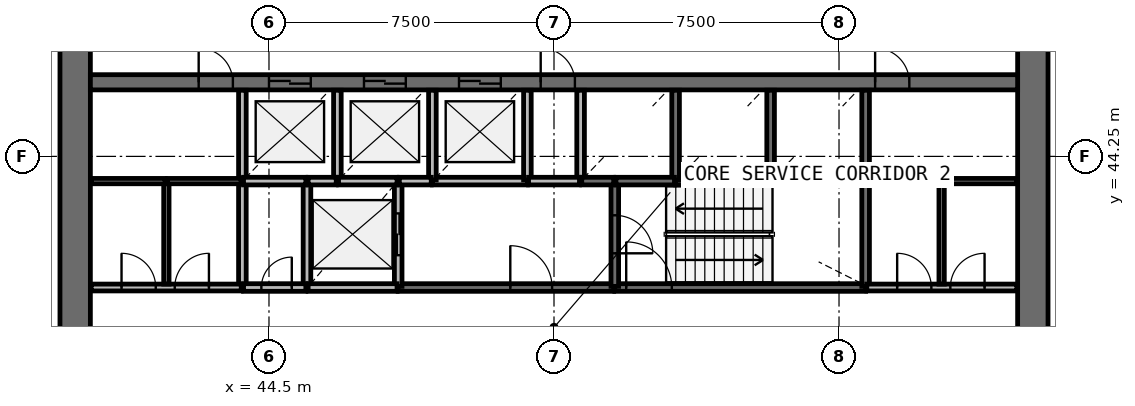
"""IFC4 building model, lengths in metres.
Left out: names, types, materials, properties, quantities, classifications, styles, units other than length and angle.
Written with IfcOpenShell. Run it as: python <this file> out.ifc"""

import sys

from ifc_helpers import new_model, si_unit, direction, frame, frame_2d, origin, place, context, subcontext, project, spatial, rectangle, extrude, source, transform, mapped, element, fill, save


model = new_model("IFC4")
c1 = context("Model", 3, precision=1e-05, world=origin(), true_north=direction((0.0, 1.0)))
c2 = subcontext(c1, "Body", "Model", "MODEL_VIEW")
j1 = project(units=[si_unit("LENGTHUNIT", "METRE"), si_unit("PLANEANGLEUNIT", "RADIAN")], contexts=[c1])
p1 = place(None, origin())
s1 = spatial("IfcSite", under=j1, at=p1, CompositionType="ELEMENT")
p2 = place(p1, origin())
s2 = spatial("IfcBuilding", under=s1, at=p2, CompositionType="ELEMENT")
p3 = place(p2, frame((0.0, 0.0, 92.1)))
s3 = spatial("IfcBuildingStorey", under=s2, at=p3, CompositionType="ELEMENT", Elevation=92.1)
p4 = place(p3, frame((64.6, 38.0, 0.0), z_axis=(0.0, 0.0, 1.0), x_axis=(0.0, 1.0, 0.0)))
e1 = element("IfcWall", 1, at=p4, inside=s3, PredefinedType="SHEAR", context=c2, shape_type="SweptSolid", body=[
    extrude(rectangle(XDim=20.0, YDim=0.8, at=frame_2d((10.0, 0.0))), origin(), (0.0, 0.0, 1.0), 4.1),
])
p5 = place(p4, frame((9.1, 0.0, 0.0)))
e2 = element("IfcOpeningElement", 2, at=p5, cuts=e1, PredefinedType="OPENING", context=c2, shape_type="SweptSolid", body=[
    extrude(rectangle(XDim=1.8, YDim=2.1, at=frame_2d((0.9, 1.05))), frame((0.0, 0.41, 0.0), z_axis=(0.0, -1.0, 0.0), x_axis=(1.0, 0.0, 0.0)), (0.0, 0.0, 1.0), 0.82),
])
p6 = place(p3, frame((39.4, 58.0, 0.0), z_axis=(0.0, 0.0, 1.0), x_axis=(0.0, -1.0, 0.0)))
e3 = element("IfcWall", 3, at=p6, inside=s3, PredefinedType="SHEAR", context=c2, shape_type="SweptSolid", body=[
    extrude(rectangle(XDim=20.0, YDim=0.8, at=frame_2d((10.0, 0.0))), origin(), (0.0, 0.0, 1.0), 4.1),
])
p7 = place(p6, frame((9.1, 0.0, 0.0)))
e4 = element("IfcOpeningElement", 4, at=p7, cuts=e3, PredefinedType="OPENING", context=c2, shape_type="SweptSolid", body=[
    extrude(rectangle(XDim=1.8, YDim=2.1, at=frame_2d((0.9, 1.05))), frame((0.0, 0.41, 0.0), z_axis=(0.0, -1.0, 0.0), x_axis=(1.0, 0.0, 0.0)), (0.0, 0.0, 1.0), 0.82),
])
p8 = place(p3, frame((39.8, 46.2, 0.0), z_axis=(0.0, 0.0, 1.0), x_axis=(1.0, 0.0, 0.0)))
e5 = element("IfcWall", 5, at=p8, inside=s3, PredefinedType="SHEAR", context=c2, shape_type="SweptSolid", body=[
    extrude(rectangle(XDim=24.4, YDim=0.4, at=frame_2d((12.2, 0.0))), origin(), (0.0, 0.0, 1.0), 4.1),
])
p9 = place(p8, frame((4.7, 0.0, 0.0)))
e6 = element("IfcOpeningElement", 6, at=p9, cuts=e5, PredefinedType="OPENING", context=c2, shape_type="SweptSolid", body=[
    extrude(rectangle(XDim=1.1, YDim=2.1, at=frame_2d((0.55, 1.05))), frame((0.0, 0.21, 0.0), z_axis=(0.0, -1.0, 0.0), x_axis=(1.0, 0.0, 0.0)), (0.0, 0.0, 1.0), 0.42),
])
p10 = place(p8, frame((7.2, 0.0, 0.0)))
e7 = element("IfcOpeningElement", 7, at=p10, cuts=e5, PredefinedType="OPENING", context=c2, shape_type="SweptSolid", body=[
    extrude(rectangle(XDim=1.1, YDim=2.1, at=frame_2d((0.55, 1.05))), frame((0.0, 0.21, 0.0), z_axis=(0.0, -1.0, 0.0), x_axis=(1.0, 0.0, 0.0)), (0.0, 0.0, 1.0), 0.42),
])
p11 = place(p8, frame((9.7, 0.0, 0.0)))
e8 = element("IfcOpeningElement", 8, at=p11, cuts=e5, PredefinedType="OPENING", context=c2, shape_type="SweptSolid", body=[
    extrude(rectangle(XDim=1.1, YDim=2.1, at=frame_2d((0.55, 1.05))), frame((0.0, 0.21, 0.0), z_axis=(0.0, -1.0, 0.0), x_axis=(1.0, 0.0, 0.0)), (0.0, 0.0, 1.0), 0.42),
])
p12 = place(p8, frame((20.65, 0.0, 0.0)))
e9 = element("IfcOpeningElement", 9, at=p12, cuts=e5, PredefinedType="OPENING", context=c2, shape_type="SweptSolid", body=[
    extrude(rectangle(XDim=0.9, YDim=2.1, at=frame_2d((0.45, 1.05))), frame((0.0, 0.21, 0.0), z_axis=(0.0, -1.0, 0.0), x_axis=(1.0, 0.0, 0.0)), (0.0, 0.0, 1.0), 0.42),
])
p13 = place(p8, frame((2.85, 0.0, 0.0)))
e10 = element("IfcOpeningElement", 10, at=p13, cuts=e5, PredefinedType="OPENING", context=c2, shape_type="SweptSolid", body=[
    extrude(rectangle(XDim=0.9, YDim=2.1, at=frame_2d((0.45, 1.05))), frame((0.0, 0.21, 0.0), z_axis=(0.0, -1.0, 0.0), x_axis=(1.0, 0.0, 0.0)), (0.0, 0.0, 1.0), 0.42),
])
p14 = place(p8, frame((11.85, 0.0, 0.0)))
e11 = element("IfcOpeningElement", 11, at=p14, cuts=e5, PredefinedType="OPENING", context=c2, shape_type="SweptSolid", body=[
    extrude(rectangle(XDim=0.9, YDim=2.1, at=frame_2d((0.45, 1.05))), frame((0.0, 0.21, 0.0), z_axis=(0.0, -1.0, 0.0), x_axis=(1.0, 0.0, 0.0)), (0.0, 0.0, 1.0), 0.42),
])
p15 = place(p3, frame((53.6, 40.8, 0.0), z_axis=(0.0, 0.0, 1.0), x_axis=(1.0, 0.0, 0.0)))
e12 = element("IfcWall", 12, at=p15, inside=s3, PredefinedType="SOLIDWALL", context=c2, shape_type="SweptSolid", body=[
    extrude(rectangle(XDim=6.6, YDim=0.2, at=frame_2d((3.3, 0.0))), origin(), (0.0, 0.0, 1.0), 3.7),
])
p16 = place(p15, frame((0.3, 0.0, 0.0)))
e13 = element("IfcOpeningElement", 13, at=p16, cuts=e12, PredefinedType="OPENING", context=c2, shape_type="SweptSolid", body=[
    extrude(rectangle(XDim=1.2, YDim=2.1, at=frame_2d((0.6, 1.05))), frame((0.0, 0.11, 0.0), z_axis=(0.0, -1.0, 0.0), x_axis=(1.0, 0.0, 0.0)), (0.0, 0.0, 1.0), 0.22),
])
p17 = place(p3, frame((47.9, 40.8, 0.0), z_axis=(0.0, 0.0, 1.0), x_axis=(1.0, 0.0, 0.0)))
e14 = element("IfcWall", 14, at=p17, inside=s3, PredefinedType="SOLIDWALL", context=c2, shape_type="SweptSolid", body=[
    extrude(rectangle(XDim=5.67, YDim=0.2, at=frame_2d((2.835, 0.0))), origin(), (0.0, 0.0, 1.0), 3.7),
])
p18 = place(p17, frame((2.95, 0.0, 0.0)))
e15 = element("IfcOpeningElement", 15, at=p18, cuts=e14, PredefinedType="OPENING", context=c2, shape_type="SweptSolid", body=[
    extrude(rectangle(XDim=1.1, YDim=2.1, at=frame_2d((0.55, 1.05))), frame((0.0, 0.11, 0.0), z_axis=(0.0, -1.0, 0.0), x_axis=(1.0, 0.0, 0.0)), (0.0, 0.0, 1.0), 0.22),
])
for number, where, z_axis, x_axis in (
    (16, (43.8, 43.6, 0.0), (0.0, 0.0, 1.0), (0.0, -1.0, 0.0)),
    (17, (45.5, 43.6, 0.0), (0.0, 0.0, 1.0), (0.0, -1.0, 0.0)),
):
    element("IfcWall", number, at=place(p3, frame(where, z_axis=z_axis, x_axis=x_axis)), inside=s3, PredefinedType="SOLIDWALL", context=c2, shape_type="SweptSolid", body=[
        extrude(rectangle(XDim=2.8, YDim=0.2, at=frame_2d((1.4, 0.0))), origin(), (0.0, 0.0, 1.0), 3.7),
    ])
p19 = place(p3, frame((47.9, 40.83, 0.0), z_axis=(0.0, 0.0, 1.0), x_axis=(0.0, 1.0, 0.0)))
e18 = element("IfcWall", 18, at=p19, inside=s3, PredefinedType="SOLIDWALL", context=c2, shape_type="SweptSolid", body=[
    extrude(rectangle(XDim=2.77, YDim=0.2, at=frame_2d((1.385, 0.0))), origin(), (0.0, 0.0, 1.0), 3.7),
])
p20 = place(p19, frame((0.82, 0.0, 0.0)))
e19 = element("IfcOpeningElement", 19, at=p20, cuts=e18, PredefinedType="OPENING", context=c2, shape_type="SweptSolid", body=[
    extrude(rectangle(XDim=1.1, YDim=2.1, at=frame_2d((0.55, 1.05))), frame((0.0, 0.11, 0.0), z_axis=(0.0, -1.0, 0.0), x_axis=(1.0, 0.0, 0.0)), (0.0, 0.0, 1.0), 0.22),
])
p21 = place(p3, frame((60.2, 40.83, 0.0), z_axis=(0.0, 0.0, 1.0), x_axis=(0.0, 1.0, 0.0)))
e20 = element("IfcWall", 20, at=p21, inside=s3, PredefinedType="SOLIDWALL", context=c2, shape_type="SweptSolid", body=[
    extrude(rectangle(XDim=2.77, YDim=0.2, at=frame_2d((1.385, 0.0))), origin(), (0.0, 0.0, 1.0), 3.7),
])
p22 = place(p3, frame((53.6, 43.6, 0.0), z_axis=(0.0, 0.0, 1.0), x_axis=(0.0, -1.0, 0.0)))
e21 = element("IfcWall", 21, at=p22, inside=s3, PredefinedType="SOLIDWALL", context=c2, shape_type="SweptSolid", body=[
    extrude(rectangle(XDim=2.77, YDim=0.2, at=frame_2d((1.385, 0.0))), origin(), (0.0, 0.0, 1.0), 3.7),
])
p23 = place(p22, frame((0.9, 0.0, 0.0)))
e22 = element("IfcOpeningElement", 22, at=p23, cuts=e21, PredefinedType="OPENING", context=c2, shape_type="SweptSolid", body=[
    extrude(rectangle(XDim=1.0, YDim=2.1, at=frame_2d((0.5, 1.05))), frame((0.0, 0.11, 0.0), z_axis=(0.0, -1.0, 0.0), x_axis=(1.0, 0.0, 0.0)), (0.0, 0.0, 1.0), 0.22),
])
for number, where, z_axis, x_axis in (
    (23, (48.8, 43.6, 0.0), (0.0, 0.0, 1.0), (1.0, 0.0, 0.0)),
    (24, (55.2, 43.6, 0.0), (0.0, 0.0, 1.0), (1.0, 0.0, 0.0)),
):
    element("IfcWall", number, at=place(p3, frame(where, z_axis=z_axis, x_axis=x_axis)), inside=s3, PredefinedType="SOLIDWALL", context=c2, shape_type="SweptSolid", body=[
        extrude(rectangle(XDim=2.5, YDim=0.2, at=frame_2d((1.25, 0.0))), origin(), (0.0, 0.0, 1.0), 3.7),
    ])
p24 = place(p3, frame((57.73, 43.6, 0.0), z_axis=(0.0, 0.0, 1.0), x_axis=(1.0, 0.0, 0.0)))
e25 = element("IfcWall", 25, at=p24, inside=s3, PredefinedType="SOLIDWALL", context=c2, shape_type="SweptSolid", body=[
    extrude(rectangle(XDim=2.44, YDim=0.2, at=frame_2d((1.22, 0.0))), origin(), (0.0, 0.0, 1.0), 3.7),
])
p25 = place(p3, frame((45.53, 40.8, 0.0), z_axis=(0.0, 0.0, 1.0), x_axis=(1.0, 0.0, 0.0)))
e26 = element("IfcWall", 26, at=p25, inside=s3, PredefinedType="SOLIDWALL", context=c2, shape_type="SweptSolid", body=[
    extrude(rectangle(XDim=2.34, YDim=0.2, at=frame_2d((1.17, 0.0))), origin(), (0.0, 0.0, 1.0), 3.7),
])
p26 = place(p3, frame((43.8, 45.99, 0.0), z_axis=(0.0, 0.0, 1.0), x_axis=(0.0, -1.0, 0.0)))
e27 = element("IfcWall", 27, at=p26, inside=s3, PredefinedType="SOLIDWALL", context=c2, shape_type="SweptSolid", body=[
    extrude(rectangle(XDim=2.36, YDim=0.2, at=frame_2d((1.18, 0.0))), origin(), (0.0, 0.0, 1.0), 3.7),
])
p27 = place(p3, frame((46.3, 43.6, 0.0), z_axis=(0.0, 0.0, 1.0), x_axis=(0.0, 1.0, 0.0)))
e28 = element("IfcWall", 28, at=p27, inside=s3, PredefinedType="SOLIDWALL", context=c2, shape_type="SweptSolid", body=[
    extrude(rectangle(XDim=2.39, YDim=0.2, at=frame_2d((1.195, 0.0))), origin(), (0.0, 0.0, 1.0), 3.7),
])
for number, where, z_axis, x_axis in (
    (29, (48.8, 43.63, 0.0), (0.0, 0.0, 1.0), (0.0, 1.0, 0.0)),
    (30, (51.3, 43.63, 0.0), (0.0, 0.0, 1.0), (0.0, 1.0, 0.0)),
):
    element("IfcWall", number, at=place(p3, frame(where, z_axis=z_axis, x_axis=x_axis)), inside=s3, PredefinedType="SOLIDWALL", context=c2, shape_type="SweptSolid", body=[
        extrude(rectangle(XDim=2.36, YDim=0.2, at=frame_2d((1.18, 0.0))), origin(), (0.0, 0.0, 1.0), 3.7),
    ])
p28 = place(p3, frame((52.7, 45.99, 0.0), z_axis=(0.0, 0.0, 1.0), x_axis=(0.0, -1.0, 0.0)))
e31 = element("IfcWall", 31, at=p28, inside=s3, PredefinedType="SOLIDWALL", context=c2, shape_type="SweptSolid", body=[
    extrude(rectangle(XDim=2.39, YDim=0.2, at=frame_2d((1.195, 0.0))), origin(), (0.0, 0.0, 1.0), 3.7),
])
for number, where, z_axis, x_axis in (
    (32, (55.2, 43.63, 0.0), (0.0, 0.0, 1.0), (0.0, 1.0, 0.0)),
    (33, (57.7, 43.63, 0.0), (0.0, 0.0, 1.0), (0.0, 1.0, 0.0)),
    (34, (60.2, 43.63, 0.0), (0.0, 0.0, 1.0), (0.0, 1.0, 0.0)),
):
    element("IfcWall", number, at=place(p3, frame(where, z_axis=z_axis, x_axis=x_axis)), inside=s3, PredefinedType="SOLIDWALL", context=c2, shape_type="SweptSolid", body=[
        extrude(rectangle(XDim=2.36, YDim=0.2, at=frame_2d((1.18, 0.0))), origin(), (0.0, 0.0, 1.0), 3.7),
    ])
p29 = place(p3, frame((43.83, 43.6, 0.0), z_axis=(0.0, 0.0, 1.0), x_axis=(1.0, 0.0, 0.0)))
e35 = element("IfcWall", 35, at=p29, inside=s3, PredefinedType="SOLIDWALL", context=c2, shape_type="SweptSolid", body=[
    extrude(rectangle(XDim=1.64, YDim=0.2, at=frame_2d((0.82, 0.0))), origin(), (0.0, 0.0, 1.0), 3.7),
])
p30 = place(p3, frame((43.83, 40.8, 0.0), z_axis=(0.0, 0.0, 1.0), x_axis=(1.0, 0.0, 0.0)))
e36 = element("IfcWall", 36, at=p30, inside=s3, PredefinedType="SOLIDWALL", context=c2, shape_type="SweptSolid", body=[
    extrude(rectangle(XDim=1.64, YDim=0.2, at=frame_2d((0.82, 0.0))), origin(), (0.0, 0.0, 1.0), 3.7),
])
p31 = place(p30, frame((0.47, 0.0, 0.0)))
e37 = element("IfcOpeningElement", 37, at=p31, cuts=e36, PredefinedType="OPENING", context=c2, shape_type="SweptSolid", body=[
    extrude(rectangle(XDim=0.8, YDim=2.1, at=frame_2d((0.4, 1.05))), frame((0.0, 0.11, 0.0), z_axis=(0.0, -1.0, 0.0), x_axis=(1.0, 0.0, 0.0)), (0.0, 0.0, 1.0), 0.22),
])
for number, where, z_axis, x_axis in (
    (38, (46.33, 43.6, 0.0), (0.0, 0.0, 1.0), (1.0, 0.0, 0.0)),
    (39, (53.63, 43.6, 0.0), (0.0, 0.0, 1.0), (1.0, 0.0, 0.0)),
):
    element("IfcWall", number, at=place(p3, frame(where, z_axis=z_axis, x_axis=x_axis)), inside=s3, PredefinedType="SOLIDWALL", context=c2, shape_type="SweptSolid", body=[
        extrude(rectangle(XDim=1.54, YDim=0.2, at=frame_2d((0.77, 0.0))), origin(), (0.0, 0.0, 1.0), 3.7),
    ])
p32 = place(p3, frame((52.67, 43.6, 0.0), z_axis=(0.0, 0.0, 1.0), x_axis=(-1.0, 0.0, 0.0)))
e40 = element("IfcWall", 40, at=p32, inside=s3, PredefinedType="SOLIDWALL", context=c2, shape_type="SweptSolid", body=[
    extrude(rectangle(XDim=1.34, YDim=0.2, at=frame_2d((0.67, 0.0))), origin(), (0.0, 0.0, 1.0), 3.7),
])
for number, where, z_axis, x_axis in (
    (41, (47.93, 43.6, 0.0), (0.0, 0.0, 1.0), (1.0, 0.0, 0.0)),
    (42, (52.73, 43.6, 0.0), (0.0, 0.0, 1.0), (1.0, 0.0, 0.0)),
):
    element("IfcWall", number, at=place(p3, frame(where, z_axis=z_axis, x_axis=x_axis)), inside=s3, PredefinedType="SOLIDWALL", context=c2, shape_type="SweptSolid", body=[
        extrude(rectangle(XDim=0.84, YDim=0.2, at=frame_2d((0.42, 0.0))), origin(), (0.0, 0.0, 1.0), 3.7),
    ])
p33 = place(p3, frame((45.53, 43.6, 0.0), z_axis=(0.0, 0.0, 1.0), x_axis=(1.0, 0.0, 0.0)))
e43 = element("IfcWall", 43, at=p33, inside=s3, PredefinedType="SOLIDWALL", context=c2, shape_type="SweptSolid", body=[
    extrude(rectangle(XDim=0.74, YDim=0.2, at=frame_2d((0.37, 0.0))), origin(), (0.0, 0.0, 1.0), 3.7),
])
p34 = place(p3, frame((60.23, 40.8, 0.0), z_axis=(0.0, 0.0, 1.0), x_axis=(1.0, 0.0, 0.0)))
e44 = element("IfcWall", 44, at=p34, inside=s3, PredefinedType="PARTITIONING", context=c2, shape_type="SweptSolid", body=[
    extrude(rectangle(XDim=3.95, YDim=0.18, at=frame_2d((1.975, 0.0))), origin(), (0.0, 0.0, 1.0), 3.7),
])
p35 = place(p34, frame((0.8, 0.0, 0.0)))
e45 = element("IfcOpeningElement", 45, at=p35, cuts=e44, PredefinedType="OPENING", context=c2, shape_type="SweptSolid", body=[
    extrude(rectangle(XDim=0.9, YDim=2.1, at=frame_2d((0.45, 1.05))), frame((0.0, 0.1, 0.0), z_axis=(0.0, -1.0, 0.0), x_axis=(1.0, 0.0, 0.0)), (0.0, 0.0, 1.0), 0.2),
])
p36 = place(p34, frame((2.2, 0.0, 0.0)))
e46 = element("IfcOpeningElement", 46, at=p36, cuts=e44, PredefinedType="OPENING", context=c2, shape_type="SweptSolid", body=[
    extrude(rectangle(XDim=0.9, YDim=2.1, at=frame_2d((0.45, 1.05))), frame((0.0, 0.1, 0.0), z_axis=(0.0, -1.0, 0.0), x_axis=(1.0, 0.0, 0.0)), (0.0, 0.0, 1.0), 0.2),
])
p37 = place(p3, frame((39.82, 40.8, 0.0), z_axis=(0.0, 0.0, 1.0), x_axis=(1.0, 0.0, 0.0)))
e47 = element("IfcWall", 47, at=p37, inside=s3, PredefinedType="PARTITIONING", context=c2, shape_type="SweptSolid", body=[
    extrude(rectangle(XDim=3.95, YDim=0.18, at=frame_2d((1.975, 0.0))), origin(), (0.0, 0.0, 1.0), 3.7),
])
p38 = place(p37, frame((0.8, 0.0, 0.0)))
e48 = element("IfcOpeningElement", 48, at=p38, cuts=e47, PredefinedType="OPENING", context=c2, shape_type="SweptSolid", body=[
    extrude(rectangle(XDim=0.9, YDim=2.1, at=frame_2d((0.45, 1.05))), frame((0.0, 0.1, 0.0), z_axis=(0.0, -1.0, 0.0), x_axis=(1.0, 0.0, 0.0)), (0.0, 0.0, 1.0), 0.2),
])
p39 = place(p37, frame((2.2, 0.0, 0.0)))
e49 = element("IfcOpeningElement", 49, at=p39, cuts=e47, PredefinedType="OPENING", context=c2, shape_type="SweptSolid", body=[
    extrude(rectangle(XDim=0.9, YDim=2.1, at=frame_2d((0.45, 1.05))), frame((0.0, 0.1, 0.0), z_axis=(0.0, -1.0, 0.0), x_axis=(1.0, 0.0, 0.0)), (0.0, 0.0, 1.0), 0.2),
])
for number, where, z_axis, x_axis in (
    (50, (41.8, 40.89, 0.0), (0.0, 0.0, 1.0), (0.0, 1.0, 0.0)),
    (51, (62.2, 40.89, 0.0), (0.0, 0.0, 1.0), (0.0, 1.0, 0.0)),
):
    element("IfcWall", number, at=place(p3, frame(where, z_axis=z_axis, x_axis=x_axis)), inside=s3, PredefinedType="PARTITIONING", context=c2, shape_type="SweptSolid", body=[
        extrude(rectangle(XDim=2.71, YDim=0.14, at=frame_2d((1.355, 0.0))), origin(), (0.0, 0.0, 1.0), 2.9),
    ])
for number, where, z_axis, x_axis in (
    (52, (43.77, 43.6, 0.0), (0.0, 0.0, 1.0), (-1.0, 0.0, 0.0)),
    (53, (60.23, 43.6, 0.0), (0.0, 0.0, 1.0), (1.0, 0.0, 0.0)),
):
    element("IfcWall", number, at=place(p3, frame(where, z_axis=z_axis, x_axis=x_axis)), inside=s3, PredefinedType="PARTITIONING", context=c2, shape_type="SweptSolid", body=[
        extrude(rectangle(XDim=1.94, YDim=0.14, at=frame_2d((0.97, 0.0))), origin(), (0.0, 0.0, 1.0), 2.9),
    ])
for number, where, z_axis, x_axis in (
    (54, (62.23, 43.6, 0.0), (0.0, 0.0, 1.0), (1.0, 0.0, 0.0)),
    (55, (41.77, 43.6, 0.0), (0.0, 0.0, 1.0), (-1.0, 0.0, 0.0)),
):
    element("IfcWall", number, at=place(p3, frame(where, z_axis=z_axis, x_axis=x_axis)), inside=s3, PredefinedType="PARTITIONING", context=c2, shape_type="SweptSolid", body=[
        extrude(rectangle(XDim=1.95, YDim=0.14, at=frame_2d((0.975, 0.0))), origin(), (0.0, 0.0, 1.0), 2.9),
    ])
m1 = source(origin(), c2, "Body", "SweptSolid", [
    extrude(rectangle(XDim=1.1, YDim=2.1, at=frame_2d((0.55, 1.05))), frame((0.0, 0.025, 0.0), z_axis=(0.0, -1.0, 0.0), x_axis=(1.0, 0.0, 0.0)), (0.0, 0.0, 1.0), 0.05),
])
p40 = place(p9, origin())
e56 = element("IfcDoor", 56, at=p40, inside=s3, OperationType="DOUBLE_DOOR_SLIDING", PredefinedType="USERDEFINED", context=c2, shape_type="MappedRepresentation", body=[
    mapped(m1, transform((0.0, 0.0, 0.0), scale=1.0)),
])
fill(e6, e56)
p41 = place(p10, origin())
e57 = element("IfcDoor", 57, at=p41, inside=s3, OperationType="DOUBLE_DOOR_SLIDING", PredefinedType="USERDEFINED", context=c2, shape_type="MappedRepresentation", body=[
    mapped(m1, transform((0.0, 0.0, 0.0), scale=1.0)),
])
fill(e7, e57)
p42 = place(p11, origin())
e58 = element("IfcDoor", 58, at=p42, inside=s3, OperationType="DOUBLE_DOOR_SLIDING", PredefinedType="USERDEFINED", context=c2, shape_type="MappedRepresentation", body=[
    mapped(m1, transform((0.0, 0.0, 0.0), scale=1.0)),
])
fill(e8, e58)
p43 = place(p20, origin())
e59 = element("IfcDoor", 59, at=p43, inside=s3, OperationType="DOUBLE_DOOR_SLIDING", PredefinedType="USERDEFINED", context=c2, shape_type="MappedRepresentation", body=[
    mapped(m1, transform((0.0, 0.0, 0.0), scale=1.0)),
])
fill(e19, e59)
m2 = source(origin(), c2, "Body", "SweptSolid", [
    extrude(rectangle(XDim=1.2, YDim=2.1, at=frame_2d((0.6, 1.05))), frame((0.0, 0.025, 0.0), z_axis=(0.0, -1.0, 0.0), x_axis=(1.0, 0.0, 0.0)), (0.0, 0.0, 1.0), 0.05),
])
p44 = place(p16, origin())
e60 = element("IfcDoor", 60, at=p44, inside=s3, OperationType="SINGLE_SWING_LEFT", PredefinedType="DOOR", context=c2, shape_type="MappedRepresentation", body=[
    mapped(m2, transform((0.0, 0.0, 0.0), scale=1.0)),
])
fill(e13, e60)
m3 = source(origin(), c2, "Body", "SweptSolid", [
    extrude(rectangle(XDim=1.0, YDim=2.1, at=frame_2d((0.5, 1.05))), frame((0.0, 0.025, 0.0), z_axis=(0.0, -1.0, 0.0), x_axis=(1.0, 0.0, 0.0)), (0.0, 0.0, 1.0), 0.05),
])
p45 = place(p23, origin())
e61 = element("IfcDoor", 61, at=p45, inside=s3, OperationType="SINGLE_SWING_RIGHT", PredefinedType="DOOR", context=c2, shape_type="MappedRepresentation", body=[
    mapped(m3, transform((0.0, 0.0, 0.0), scale=1.0)),
])
fill(e22, e61)
m4 = source(origin(), c2, "Body", "SweptSolid", [
    extrude(rectangle(XDim=1.1, YDim=2.1, at=frame_2d((0.55, 1.05))), frame((0.0, 0.025, 0.0), z_axis=(0.0, -1.0, 0.0), x_axis=(1.0, 0.0, 0.0)), (0.0, 0.0, 1.0), 0.05),
])
p46 = place(p18, origin())
e62 = element("IfcDoor", 62, at=p46, inside=s3, OperationType="SINGLE_SWING_LEFT", PredefinedType="DOOR", context=c2, shape_type="MappedRepresentation", body=[
    mapped(m4, transform((0.0, 0.0, 0.0), scale=1.0)),
])
fill(e15, e62)
m5 = source(origin(), c2, "Body", "SweptSolid", [
    extrude(rectangle(XDim=0.8, YDim=2.1, at=frame_2d((0.4, 1.05))), frame((0.0, 0.025, 0.0), z_axis=(0.0, -1.0, 0.0), x_axis=(1.0, 0.0, 0.0)), (0.0, 0.0, 1.0), 0.05),
])
p47 = place(p31, origin())
e63 = element("IfcDoor", 63, at=p47, inside=s3, OperationType="SINGLE_SWING_RIGHT", PredefinedType="DOOR", context=c2, shape_type="MappedRepresentation", body=[
    mapped(m5, transform((0.0, 0.0, 0.0), scale=1.0)),
])
fill(e37, e63)
m6 = source(origin(), c2, "Body", "SweptSolid", [
    extrude(rectangle(XDim=0.9, YDim=2.1, at=frame_2d((0.45, 1.05))), frame((0.0, 0.025, 0.0), z_axis=(0.0, -1.0, 0.0), x_axis=(1.0, 0.0, 0.0)), (0.0, 0.0, 1.0), 0.05),
])
p48 = place(p38, origin())
e64 = element("IfcDoor", 64, at=p48, inside=s3, OperationType="SINGLE_SWING_LEFT", PredefinedType="DOOR", context=c2, shape_type="MappedRepresentation", body=[
    mapped(m6, transform((0.0, 0.0, 0.0), scale=1.0)),
])
fill(e48, e64)
p49 = place(p39, origin())
e65 = element("IfcDoor", 65, at=p49, inside=s3, OperationType="SINGLE_SWING_RIGHT", PredefinedType="DOOR", context=c2, shape_type="MappedRepresentation", body=[
    mapped(m6, transform((0.0, 0.0, 0.0), scale=1.0)),
])
fill(e49, e65)
p50 = place(p12, origin())
e66 = element("IfcDoor", 66, at=p50, inside=s3, OperationType="SINGLE_SWING_LEFT", PredefinedType="DOOR", context=c2, shape_type="MappedRepresentation", body=[
    mapped(m6, transform((0.0, 0.0, 0.0), scale=1.0)),
])
fill(e9, e66)
p51 = place(p35, origin())
e67 = element("IfcDoor", 67, at=p51, inside=s3, OperationType="SINGLE_SWING_LEFT", PredefinedType="DOOR", context=c2, shape_type="MappedRepresentation", body=[
    mapped(m6, transform((0.0, 0.0, 0.0), scale=1.0)),
])
fill(e45, e67)
p52 = place(p36, origin())
e68 = element("IfcDoor", 68, at=p52, inside=s3, OperationType="SINGLE_SWING_RIGHT", PredefinedType="DOOR", context=c2, shape_type="MappedRepresentation", body=[
    mapped(m6, transform((0.0, 0.0, 0.0), scale=1.0)),
])
fill(e46, e68)
p53 = place(p13, origin())
e69 = element("IfcDoor", 69, at=p53, inside=s3, OperationType="SINGLE_SWING_LEFT", PredefinedType="DOOR", context=c2, shape_type="MappedRepresentation", body=[
    mapped(m6, transform((0.0, 0.0, 0.0), scale=1.0)),
])
fill(e10, e69)
p54 = place(p14, origin())
e70 = element("IfcDoor", 70, at=p54, inside=s3, OperationType="SINGLE_SWING_LEFT", PredefinedType="DOOR", context=c2, shape_type="MappedRepresentation", body=[
    mapped(m6, transform((0.0, 0.0, 0.0), scale=1.0)),
])
fill(e11, e70)
save(model, sys.argv[1])
